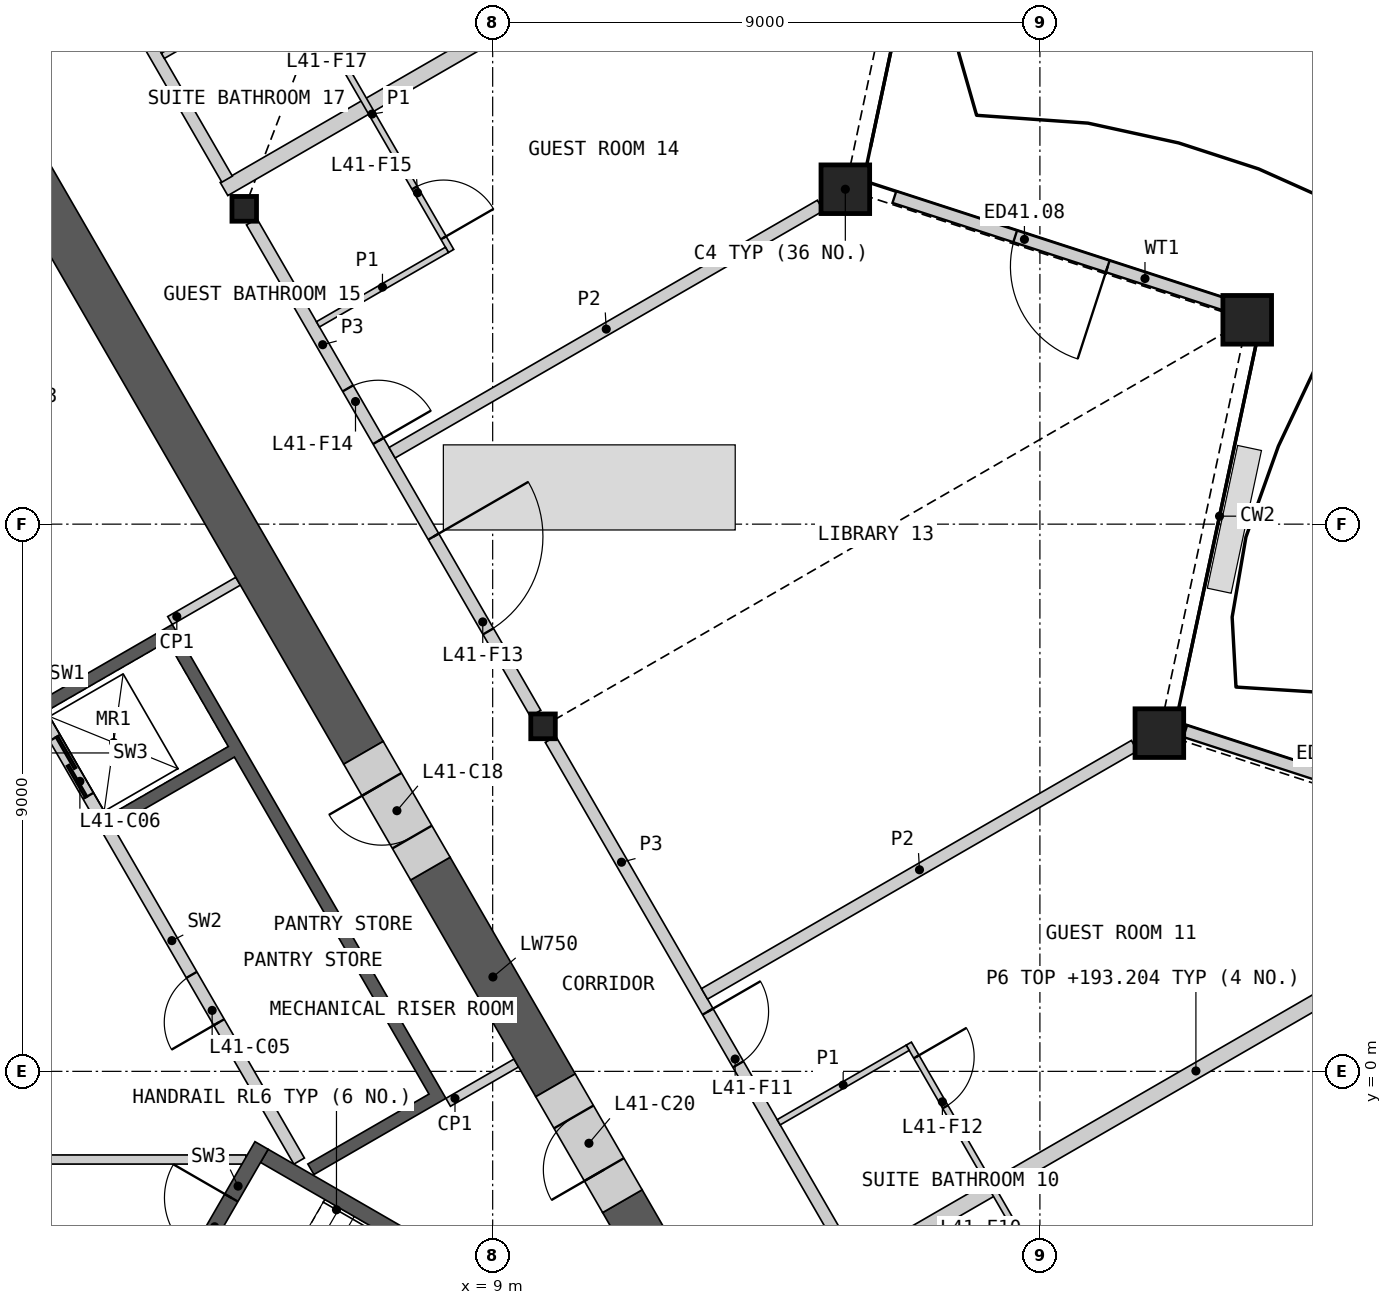
"""IFC4 building model, lengths in metres.
Left out: names, types, materials, properties, quantities, classifications, styles, units other than length and angle.
Written with IfcOpenShell. Run it as: python <this file> out.ifc"""

import sys

from ifc_helpers import new_model, si_unit, direction, frame, frame_2d, origin, origin_2d, place, context, subcontext, project, spatial, polyline, rectangle, hollow_rectangle, i_section, outline, extrude, element, fill, save


model = new_model("IFC4")
c1 = context("Model", 3, precision=1e-05, world=origin(), true_north=direction((0.0, 1.0)))
c2 = subcontext(c1, "Body", "Model", "MODEL_VIEW")
j1 = project(units=[si_unit("LENGTHUNIT", "METRE"), si_unit("PLANEANGLEUNIT", "RADIAN")], contexts=[c1])
p1 = place(None, origin())
s1 = spatial("IfcSite", under=j1, at=p1, CompositionType="ELEMENT")
p2 = place(p1, origin())
s2 = spatial("IfcBuilding", under=s1, at=p2, CompositionType="ELEMENT")
p3 = place(p2, frame((0.0, 0.0, 190.8)))
s3 = spatial("IfcBuildingStorey", under=s2, at=p3, CompositionType="ELEMENT", Elevation=190.8)
for number, where, z_axis, x_axis in (
    (1, (19.965, 5.563, 0.0), (0.0, 0.0, 1.0), (1.0, 0.0, 0.0)),
    (2, (21.409, 12.361, 0.0), (0.0, 0.0, 1.0), (1.0, 0.0, 0.0)),
    (3, (14.8, 14.508, 0.0), (0.0, 0.0, 1.0), (1.0, 0.0, 0.0)),
):
    element("IfcColumn", number, at=place(p3, frame(where, z_axis=z_axis, x_axis=x_axis)), inside=s3, PredefinedType="COLUMN", context=c2, shape_type="SweptSolid", body=[
        extrude(hollow_rectangle(XDim=0.8, YDim=0.8, WallThickness=0.05, at=origin_2d()), origin(), (0.0, 0.0, 1.0), 3.6),
    ])
for number, where, z_axis, x_axis in (
    (4, (9.828, 5.675, 0.0), (0.0, 0.0, 1.0), (1.0, 0.0, 0.0)),
    (5, (4.914, 14.186, 0.0), (0.0, 0.0, 1.0), (1.0, 0.0, 0.0)),
):
    element("IfcColumn", number, at=place(p3, frame(where, z_axis=z_axis, x_axis=x_axis)), inside=s3, PredefinedType="COLUMN", context=c2, shape_type="SweptSolid", body=[
        extrude(i_section(OverallWidth=0.404, OverallDepth=0.407, WebThickness=0.027, FlangeThickness=0.044, at=origin_2d()), origin(), (0.0, 0.0, 1.0), 3.6),
    ])
p4 = place(p3, frame((26.24, 3.693, 0.0), z_axis=(0.0, 0.0, 1.0), x_axis=(-0.951053023356, 0.30902774433, 0.0)))
e6 = element("IfcWall", 6, at=p4, inside=s3, PredefinedType="SOLIDWALL", context=c2, shape_type="SweptSolid", body=[
    extrude(rectangle(XDim=6.152, YDim=0.2, at=frame_2d((3.076, 0.0))), origin(), (0.0, 0.0, 1.0), 2.701),
])
p5 = place(p4, frame((2.089, 0.0, 0.0)))
e7 = element("IfcOpeningElement", 7, at=p5, cuts=e6, PredefinedType="OPENING", context=c2, shape_type="SweptSolid", body=[
    extrude(rectangle(XDim=1.6, YDim=2.4, at=frame_2d((0.8, 1.2))), frame((0.0, 0.11, 0.0), z_axis=(0.0, -1.0, 0.0), x_axis=(1.0, 0.0, 0.0)), (0.0, 0.0, 1.0), 0.22),
])
p6 = place(p3, frame((21.102, 12.593, 0.0), z_axis=(0.0, 0.0, 1.0), x_axis=(-0.951059834965, 0.309006780371, 0.0)))
e8 = element("IfcWall", 8, at=p6, inside=s3, PredefinedType="SOLIDWALL", context=c2, shape_type="SweptSolid", body=[
    extrude(rectangle(XDim=5.779, YDim=0.2, at=frame_2d((2.889, 0.0))), origin(), (0.0, 0.0, 1.0), 2.701),
])
p7 = place(p6, frame((2.089, 0.0, 0.0)))
e9 = element("IfcOpeningElement", 9, at=p7, cuts=e8, PredefinedType="OPENING", context=c2, shape_type="SweptSolid", body=[
    extrude(rectangle(XDim=1.6, YDim=2.4, at=frame_2d((0.8, 1.2))), frame((0.0, 0.11, 0.0), z_axis=(0.0, -1.0, 0.0), x_axis=(1.0, 0.0, 0.0)), (0.0, 0.0, 1.0), 0.22),
])
p8 = place(p3, origin())
e10 = element("IfcWall", 10, at=p8, inside=s3, PredefinedType="SHEAR", context=c2, shape_type="SweptSolid", body=[
    extrude(outline(polyline([(1.561, 6.097), (3.731, 7.35), (8.231, -0.444), (6.061, -1.697), (5.96, -1.524), (7.952, -0.374), (4.752, 5.169), (2.76, 4.019), (2.66, 4.192), (4.652, 5.342), (3.652, 7.074), (1.66, 5.924), (1.561, 6.097)])), origin(), (0.0, 0.0, 1.0), 3.25),
])
p9 = place(p3, frame((5.817, -1.476, 0.0), z_axis=(0.0, 0.0, 1.0), x_axis=(-0.500002616675, 0.866023893041, 0.0)))
e11 = element("IfcWall", 11, at=p9, inside=s3, PredefinedType="SOLIDWALL", context=c2, shape_type="SweptSolid", body=[
    extrude(rectangle(XDim=8.373, YDim=0.2, at=frame_2d((4.187, 0.0))), origin(), (0.0, 0.0, 1.0), 3.25),
])
p10 = place(p9, frame((2.637, 0.0, 0.0)))
e12 = element("IfcOpeningElement", 12, at=p10, cuts=e11, PredefinedType="OPENING", context=c2, shape_type="SweptSolid", body=[
    extrude(rectangle(XDim=0.9, YDim=2.1, at=frame_2d((0.45, 1.05))), frame((0.0, 0.11, 0.0), z_axis=(0.0, -1.0, 0.0), x_axis=(1.0, 0.0, 0.0)), (0.0, 0.0, 1.0), 0.22),
])
p11 = place(p9, frame((6.937, 0.0, 0.0)))
e13 = element("IfcOpeningElement", 13, at=p11, cuts=e11, PredefinedType="OPENING", context=c2, shape_type="SweptSolid", body=[
    extrude(rectangle(XDim=1.1, YDim=2.1, at=frame_2d((0.55, 1.05))), frame((0.0, 0.11, 0.0), z_axis=(0.0, -1.0, 0.0), x_axis=(1.0, 0.0, 0.0)), (0.0, 0.0, 1.0), 0.22),
])
p12 = place(p3, frame((-4.941, -1.45, 0.0), z_axis=(0.0, 0.0, 1.0), x_axis=(1.0, 0.0, 0.0)))
e14 = element("IfcWall", 14, at=p12, inside=s3, PredefinedType="PARTITIONING", context=c2, shape_type="SweptSolid", body=[
    extrude(rectangle(XDim=9.882, YDim=0.15, at=frame_2d((4.941, 0.0))), origin(), (0.0, 0.0, 1.0), 3.25),
])
p13 = place(p12, frame((4.391, 0.0, 0.0)))
e15 = element("IfcOpeningElement", 15, at=p13, cuts=e14, PredefinedType="OPENING", context=c2, shape_type="SweptSolid", body=[
    extrude(rectangle(XDim=1.1, YDim=2.1, at=frame_2d((0.55, 1.05))), frame((0.0, 0.085, 0.0), z_axis=(0.0, -1.0, 0.0), x_axis=(1.0, 0.0, 0.0)), (0.0, 0.0, 1.0), 0.17),
])
p14 = place(p3, origin())
e16 = element("IfcWall", 16, at=p14, inside=s3, PredefinedType="SHEAR", context=c2, shape_type="SweptSolid", body=[
    extrude(outline(polyline([(10.032, -4.298), (10.374, -4.206), (5.307, -1.281), (5.182, -1.498), (10.032, -4.298)])), origin(), (0.0, 0.0, 1.0), 3.25),
])
p15 = place(p3, frame((3.655, -3.893, 0.0), z_axis=(0.0, 0.0, 1.0), x_axis=(0.499982516597, 0.866035497597, 0.0)))
e17 = element("IfcWall", 17, at=p15, inside=s3, PredefinedType="SHEAR", context=c2, shape_type="SweptSolid", body=[
    extrude(rectangle(XDim=3.088, YDim=0.25, at=frame_2d((1.544, 0.0))), origin(), (0.0, 0.0, 1.0), 3.25),
])
p16 = place(p15, frame((0.994, 0.0, 0.0)))
e18 = element("IfcOpeningElement", 18, at=p16, cuts=e17, PredefinedType="OPENING", context=c2, shape_type="SweptSolid", body=[
    extrude(rectangle(XDim=1.1, YDim=2.1, at=frame_2d((0.55, 1.05))), frame((0.0, 0.135, 0.0), z_axis=(0.0, -1.0, 0.0), x_axis=(1.0, 0.0, 0.0)), (0.0, 0.0, 1.0), 0.27),
])
for number, where, z_axis, x_axis in (
    (19, (3.693, 7.415, 0.0), (0.0, 0.0, 1.0), (0.866, 0.5, 0.0)),
    (20, (8.268, -0.509, 0.0), (0.0, 0.0, 1.0), (0.866, 0.5, 0.0)),
):
    element("IfcWall", number, at=place(p3, frame(where, z_axis=z_axis, x_axis=x_axis)), inside=s3, PredefinedType="PARTITIONING", context=c2, shape_type="SweptSolid", body=[
        extrude(rectangle(XDim=1.293, YDim=0.15, at=frame_2d((0.646, 0.0))), origin(), (0.0, 0.0, 1.0), 3.25),
    ])
p17 = place(p3, frame((6.875, 5.24, 0.0), z_axis=(0.0, 0.0, 1.0), x_axis=(-0.499997217876, 0.866027010039, 0.0)))
e21 = element("IfcWall", 21, at=p17, inside=s3, PredefinedType="SHEAR", context=c2, shape_type="SweptSolid", body=[
    extrude(rectangle(XDim=13.101, YDim=0.75, at=frame_2d((6.551, 0.0))), origin(), (0.0, 0.0, 1.0), 3.25),
])
p18 = place(p3, frame((14.526, -8.011, 0.0), z_axis=(0.0, 0.0, 1.0), x_axis=(-0.499982018922, 0.866035784916, 0.0)))
e22 = element("IfcWall", 22, at=p18, inside=s3, PredefinedType="SHEAR", context=c2, shape_type="SweptSolid", body=[
    extrude(rectangle(XDim=6.785, YDim=0.75, at=frame_2d((3.393, 0.0))), origin(), (0.0, 0.0, 1.0), 3.25),
])
p19 = place(p3, frame((10.033, -0.23, 0.0), z_axis=(0.0, 0.0, 1.0), x_axis=(-0.500030520673, 0.866007781949, 0.0)))
e23 = element("IfcWall", 23, at=p19, inside=s3, PredefinedType="SHEAR", context=c2, shape_type="SweptSolid", body=[
    extrude(rectangle(XDim=4.116, YDim=0.75, at=frame_2d((2.058, 0.0))), origin(), (0.0, 0.0, 1.0), 3.25),
])
p20 = place(p3, frame((7.975, 3.334, 0.0), z_axis=(0.0, 0.0, 1.0), x_axis=(-0.500077893725, 0.86598042715, 0.0)))
e24 = element("IfcWall", 24, at=p20, inside=s3, PredefinedType="SHEAR", context=c2, shape_type="SweptSolid", body=[
    extrude(rectangle(XDim=2.2, YDim=0.75, at=frame_2d((1.1, 0.0))), origin(), (0.0, 0.0, 1.0), 3.25),
])
p21 = place(p20, frame((0.6, 0.0, 0.0)))
e25 = element("IfcOpeningElement", 25, at=p21, cuts=e24, PredefinedType="OPENING", context=c2, shape_type="SweptSolid", body=[
    extrude(rectangle(XDim=1.0, YDim=2.1, at=frame_2d((0.5, 1.05))), frame((0.0, 0.385, 0.0), z_axis=(0.0, -1.0, 0.0), x_axis=(1.0, 0.0, 0.0)), (0.0, 0.0, 1.0), 0.77),
])
p22 = place(p3, frame((11.133, -2.135, 0.0), z_axis=(0.0, 0.0, 1.0), x_axis=(-0.499981787252, 0.866035918664, 0.0)))
e26 = element("IfcWall", 26, at=p22, inside=s3, PredefinedType="SHEAR", context=c2, shape_type="SweptSolid", body=[
    extrude(rectangle(XDim=2.2, YDim=0.75, at=frame_2d((1.1, 0.0))), origin(), (0.0, 0.0, 1.0), 3.25),
])
p23 = place(p22, frame((0.6, 0.0, 0.0)))
e27 = element("IfcOpeningElement", 27, at=p23, cuts=e26, PredefinedType="OPENING", context=c2, shape_type="SweptSolid", body=[
    extrude(rectangle(XDim=1.0, YDim=2.1, at=frame_2d((0.5, 1.05))), frame((0.0, 0.385, 0.0), z_axis=(0.0, -1.0, 0.0), x_axis=(1.0, 0.0, 0.0)), (0.0, 0.0, 1.0), 0.77),
])
p24 = place(p3, frame((14.967, -3.226, 0.0), z_axis=(0.0, 0.0, 1.0), x_axis=(0.866030250269, 0.499991605548, 0.0)))
e28 = element("IfcWall", 28, at=p24, inside=s3, PredefinedType="PARTITIONING", context=c2, shape_type="SweptSolid", body=[
    extrude(rectangle(XDim=12.929, YDim=0.25, at=frame_2d((6.465, 0.0))), origin(), (0.0, 0.0, 1.0), 2.404),
])
p25 = place(p3, frame((4.582, 14.512, 0.0), z_axis=(0.0, 0.0, 1.0), x_axis=(0.866027263711, 0.4999967785, 0.0)))
e29 = element("IfcWall", 29, at=p25, inside=s3, PredefinedType="PARTITIONING", context=c2, shape_type="SweptSolid", body=[
    extrude(rectangle(XDim=12.994, YDim=0.25, at=frame_2d((6.497, 0.0))), origin(), (0.0, 0.0, 1.0), 2.404),
])
p26 = place(p3, frame((5.038, 13.972, 0.0), z_axis=(0.0, 0.0, 1.0), x_axis=(0.50000393355, -0.866023132736, 0.0)))
e30 = element("IfcWall", 30, at=p26, inside=s3, PredefinedType="PARTITIONING", context=c2, shape_type="SweptSolid", body=[
    extrude(rectangle(XDim=9.335, YDim=0.2, at=frame_2d((4.667, 0.0))), origin(), (0.0, 0.0, 1.0), 3.25),
])
p27 = place(p26, frame((5.979, 0.0, 0.0)))
e31 = element("IfcOpeningElement", 31, at=p27, cuts=e30, PredefinedType="OPENING", context=c2, shape_type="SweptSolid", body=[
    extrude(rectangle(XDim=1.8, YDim=2.1, at=frame_2d((0.9, 1.05))), frame((0.0, 0.11, 0.0), z_axis=(0.0, -1.0, 0.0), x_axis=(1.0, 0.0, 0.0)), (0.0, 0.0, 1.0), 0.22),
])
p28 = place(p26, frame((3.163, 0.0, 0.0)))
e32 = element("IfcOpeningElement", 32, at=p28, cuts=e30, PredefinedType="OPENING", context=c2, shape_type="SweptSolid", body=[
    extrude(rectangle(XDim=1.0, YDim=2.1, at=frame_2d((0.5, 1.05))), frame((0.0, 0.11, 0.0), z_axis=(0.0, -1.0, 0.0), x_axis=(1.0, 0.0, 0.0)), (0.0, 0.0, 1.0), 0.22),
])
p29 = place(p3, frame((9.952, 5.461, 0.0), z_axis=(0.0, 0.0, 1.0), x_axis=(0.50000393355, -0.866023132736, 0.0)))
e33 = element("IfcWall", 33, at=p29, inside=s3, PredefinedType="PARTITIONING", context=c2, shape_type="SweptSolid", body=[
    extrude(rectangle(XDim=9.335, YDim=0.2, at=frame_2d((4.667, 0.0))), origin(), (0.0, 0.0, 1.0), 3.25),
])
p30 = place(p29, frame((5.172, 0.0, 0.0)))
e34 = element("IfcOpeningElement", 34, at=p30, cuts=e33, PredefinedType="OPENING", context=c2, shape_type="SweptSolid", body=[
    extrude(rectangle(XDim=1.0, YDim=2.1, at=frame_2d((0.5, 1.05))), frame((0.0, 0.11, 0.0), z_axis=(0.0, -1.0, 0.0), x_axis=(1.0, 0.0, 0.0)), (0.0, 0.0, 1.0), 0.22),
])
p31 = place(p3, frame((1.913, 19.385, 0.0), z_axis=(0.0, 0.0, 1.0), x_axis=(0.499972435384, -0.866041317638, 0.0)))
e35 = element("IfcWall", 35, at=p31, inside=s3, PredefinedType="PARTITIONING", context=c2, shape_type="SweptSolid", body=[
    extrude(rectangle(XDim=5.439, YDim=0.2, at=frame_2d((2.719, 0.0))), origin(), (0.0, 0.0, 1.0), 3.25),
])
p32 = place(p31, frame((0.351, 0.0, 0.0)))
e36 = element("IfcOpeningElement", 36, at=p32, cuts=e35, PredefinedType="OPENING", context=c2, shape_type="SweptSolid", body=[
    extrude(rectangle(XDim=1.1, YDim=2.1, at=frame_2d((0.55, 1.05))), frame((0.0, 0.11, 0.0), z_axis=(0.0, -1.0, 0.0), x_axis=(1.0, 0.0, 0.0)), (0.0, 0.0, 1.0), 0.22),
])
p33 = place(p3, frame((12.484, 1.274, 0.0), z_axis=(0.0, 0.0, 1.0), x_axis=(0.866026229868, 0.499998569178, 0.0)))
e37 = element("IfcWall", 37, at=p33, inside=s3, PredefinedType="PARTITIONING", context=c2, shape_type="SweptSolid", body=[
    extrude(rectangle(XDim=8.164, YDim=0.2, at=frame_2d((4.082, 0.0))), origin(), (0.0, 0.0, 1.0), 2.404),
])
p34 = place(p3, frame((7.346, 10.175, 0.0), z_axis=(0.0, 0.0, 1.0), x_axis=(0.86602913801, 0.499993532075, 0.0)))
e38 = element("IfcWall", 38, at=p34, inside=s3, PredefinedType="PARTITIONING", context=c2, shape_type="SweptSolid", body=[
    extrude(rectangle(XDim=8.134, YDim=0.2, at=frame_2d((4.067, 0.0))), origin(), (0.0, 0.0, 1.0), 2.404),
])
p35 = place(p3, frame((15.844, 0.456, 0.0), z_axis=(0.0, 0.0, 1.0), x_axis=(0.500006934395, -0.866021400173, 0.0)))
e39 = element("IfcWall", 39, at=p35, inside=s3, PredefinedType="PARTITIONING", context=c2, shape_type="SweptSolid", body=[
    extrude(rectangle(XDim=5.2, YDim=0.1, at=frame_2d((2.6, 0.0))), origin(), (0.0, 0.0, 1.0), 2.404),
])
p36 = place(p35, frame((4.0, 0.0, 0.0)))
e40 = element("IfcOpeningElement", 40, at=p36, cuts=e39, PredefinedType="OPENING", context=c2, shape_type="SweptSolid", body=[
    extrude(rectangle(XDim=0.95, YDim=2.1, at=frame_2d((0.475, 1.05))), frame((0.0, 0.06, 0.0), z_axis=(0.0, -1.0, 0.0), x_axis=(1.0, 0.0, 0.0)), (0.0, 0.0, 1.0), 0.12),
])
p37 = place(p35, frame((0.25, 0.0, 0.0)))
e41 = element("IfcOpeningElement", 41, at=p37, cuts=e39, PredefinedType="OPENING", context=c2, shape_type="SweptSolid", body=[
    extrude(rectangle(XDim=0.95, YDim=2.1, at=frame_2d((0.475, 1.05))), frame((0.0, 0.06, 0.0), z_axis=(0.0, -1.0, 0.0), x_axis=(1.0, 0.0, 0.0)), (0.0, 0.0, 1.0), 0.12),
])
p38 = place(p3, frame((5.717, 17.996, 0.0), z_axis=(0.0, 0.0, 1.0), x_axis=(0.500027264788, -0.866009661879, 0.0)))
e42 = element("IfcWall", 42, at=p38, inside=s3, PredefinedType="PARTITIONING", context=c2, shape_type="SweptSolid", body=[
    extrude(rectangle(XDim=5.2, YDim=0.1, at=frame_2d((2.6, 0.0))), origin(), (0.0, 0.0, 1.0), 2.404),
])
p39 = place(p38, frame((4.0, 0.0, 0.0)))
e43 = element("IfcOpeningElement", 43, at=p39, cuts=e42, PredefinedType="OPENING", context=c2, shape_type="SweptSolid", body=[
    extrude(rectangle(XDim=0.95, YDim=2.1, at=frame_2d((0.475, 1.05))), frame((0.0, 0.06, 0.0), z_axis=(0.0, -1.0, 0.0), x_axis=(1.0, 0.0, 0.0)), (0.0, 0.0, 1.0), 0.12),
])
p40 = place(p38, frame((0.25, 0.0, 0.0)))
e44 = element("IfcOpeningElement", 44, at=p40, cuts=e42, PredefinedType="OPENING", context=c2, shape_type="SweptSolid", body=[
    extrude(rectangle(XDim=0.95, YDim=2.1, at=frame_2d((0.475, 1.05))), frame((0.0, 0.06, 0.0), z_axis=(0.0, -1.0, 0.0), x_axis=(1.0, 0.0, 0.0)), (0.0, 0.0, 1.0), 0.12),
])
p41 = place(p3, frame((3.576, 16.703, 0.0), z_axis=(0.0, 0.0, 1.0), x_axis=(0.866057815567, 0.499943856944, 0.0)))
e45 = element("IfcWall", 45, at=p41, inside=s3, PredefinedType="PARTITIONING", context=c2, shape_type="SweptSolid", body=[
    extrude(rectangle(XDim=2.45, YDim=0.1, at=frame_2d((1.225, 0.0))), origin(), (0.0, 0.0, 1.0), 2.404),
])
p42 = place(p3, frame((6.126, 12.286, 0.0), z_axis=(0.0, 0.0, 1.0), x_axis=(0.866014668023, 0.500018594424, 0.0)))
e46 = element("IfcWall", 46, at=p42, inside=s3, PredefinedType="PARTITIONING", context=c2, shape_type="SweptSolid", body=[
    extrude(rectangle(XDim=2.45, YDim=0.1, at=frame_2d((1.225, 0.0))), origin(), (0.0, 0.0, 1.0), 2.404),
])
p43 = place(p3, frame((13.704, -0.837, 0.0), z_axis=(0.0, 0.0, 1.0), x_axis=(0.865989751695, 0.500061746146, 0.0)))
e47 = element("IfcWall", 47, at=p43, inside=s3, PredefinedType="PARTITIONING", context=c2, shape_type="SweptSolid", body=[
    extrude(rectangle(XDim=2.45, YDim=0.1, at=frame_2d((1.225, 0.0))), origin(), (0.0, 0.0, 1.0), 2.404),
])
p44 = place(p7, origin())
e48 = element("IfcDoor", 48, at=p44, inside=s3, OperationType="DOUBLE_DOOR_SINGLE_SWING", PredefinedType="DOOR", context=c2, shape_type="SweptSolid", body=[
    extrude(rectangle(XDim=1.6, YDim=2.4, at=frame_2d((0.8, 1.2))), frame((0.0, 0.025, 0.0), z_axis=(0.0, -1.0, 0.0), x_axis=(1.0, 0.0, 0.0)), (0.0, 0.0, 1.0), 0.05),
])
fill(e9, e48)
p45 = place(p10, origin())
e49 = element("IfcDoor", 49, at=p45, inside=s3, OperationType="SINGLE_SWING_LEFT", PredefinedType="DOOR", context=c2, shape_type="SweptSolid", body=[
    extrude(rectangle(XDim=0.9, YDim=2.1, at=frame_2d((0.45, 1.05))), frame((0.0, 0.025, 0.0), z_axis=(0.0, -1.0, 0.0), x_axis=(1.0, 0.0, 0.0)), (0.0, 0.0, 1.0), 0.05),
])
fill(e12, e49)
p46 = place(p11, origin())
e50 = element("IfcDoor", 50, at=p46, inside=s3, OperationType="SLIDING_TO_LEFT", PredefinedType="DOOR", context=c2, shape_type="SweptSolid", body=[
    extrude(rectangle(XDim=1.1, YDim=2.1, at=frame_2d((0.55, 1.05))), frame((0.0, 0.025, 0.0), z_axis=(0.0, -1.0, 0.0), x_axis=(1.0, 0.0, 0.0)), (0.0, 0.0, 1.0), 0.05),
])
fill(e13, e50)
p47 = place(p16, origin())
e51 = element("IfcDoor", 51, at=p47, inside=s3, OperationType="SINGLE_SWING_RIGHT", PredefinedType="DOOR", context=c2, shape_type="SweptSolid", body=[
    extrude(rectangle(XDim=1.1, YDim=2.1, at=frame_2d((0.55, 1.05))), frame((0.0, 0.025, 0.0), z_axis=(0.0, -1.0, 0.0), x_axis=(1.0, 0.0, 0.0)), (0.0, 0.0, 1.0), 0.05),
])
fill(e18, e51)
p48 = place(p21, origin())
e52 = element("IfcDoor", 52, at=p48, inside=s3, OperationType="SINGLE_SWING_RIGHT", PredefinedType="DOOR", context=c2, shape_type="SweptSolid", body=[
    extrude(rectangle(XDim=1.0, YDim=2.1, at=frame_2d((0.5, 1.05))), frame((0.0, 0.13, 0.0), z_axis=(0.0, -1.0, 0.0), x_axis=(1.0, 0.0, 0.0)), (0.0, 0.0, 1.0), 0.05),
])
fill(e25, e52)
p49 = place(p23, origin())
e53 = element("IfcDoor", 53, at=p49, inside=s3, OperationType="SINGLE_SWING_LEFT", PredefinedType="DOOR", context=c2, shape_type="SweptSolid", body=[
    extrude(rectangle(XDim=1.0, YDim=2.1, at=frame_2d((0.5, 1.05))), frame((0.0, 0.13, 0.0), z_axis=(0.0, -1.0, 0.0), x_axis=(1.0, 0.0, 0.0)), (0.0, 0.0, 1.0), 0.05),
])
fill(e27, e53)
p50 = place(p30, origin())
e54 = element("IfcDoor", 54, at=p50, inside=s3, OperationType="SINGLE_SWING_LEFT", PredefinedType="DOOR", context=c2, shape_type="SweptSolid", body=[
    extrude(rectangle(XDim=1.0, YDim=2.1, at=frame_2d((0.5, 1.05))), frame((0.0, 0.025, 0.0), z_axis=(0.0, -1.0, 0.0), x_axis=(1.0, 0.0, 0.0)), (0.0, 0.0, 1.0), 0.05),
])
fill(e34, e54)
p51 = place(p37, origin())
e55 = element("IfcDoor", 55, at=p51, inside=s3, OperationType="SINGLE_SWING_LEFT", PredefinedType="DOOR", context=c2, shape_type="SweptSolid", body=[
    extrude(rectangle(XDim=0.95, YDim=2.1, at=frame_2d((0.475, 1.05))), frame((0.0, 0.025, 0.0), z_axis=(0.0, -1.0, 0.0), x_axis=(1.0, 0.0, 0.0)), (0.0, 0.0, 1.0), 0.05),
])
fill(e41, e55)
p52 = place(p27, origin())
e56 = element("IfcDoor", 56, at=p52, inside=s3, OperationType="DOUBLE_DOOR_SINGLE_SWING", PredefinedType="DOOR", context=c2, shape_type="SweptSolid", body=[
    extrude(rectangle(XDim=1.8, YDim=2.1, at=frame_2d((0.9, 1.05))), frame((0.0, 0.025, 0.0), z_axis=(0.0, -1.0, 0.0), x_axis=(1.0, 0.0, 0.0)), (0.0, 0.0, 1.0), 0.05),
])
fill(e31, e56)
p53 = place(p28, origin())
e57 = element("IfcDoor", 57, at=p53, inside=s3, OperationType="SINGLE_SWING_RIGHT", PredefinedType="DOOR", context=c2, shape_type="SweptSolid", body=[
    extrude(rectangle(XDim=1.0, YDim=2.1, at=frame_2d((0.5, 1.05))), frame((0.0, 0.025, 0.0), z_axis=(0.0, -1.0, 0.0), x_axis=(1.0, 0.0, 0.0)), (0.0, 0.0, 1.0), 0.05),
])
fill(e32, e57)
p54 = place(p39, origin())
e58 = element("IfcDoor", 58, at=p54, inside=s3, OperationType="SINGLE_SWING_RIGHT", PredefinedType="DOOR", context=c2, shape_type="SweptSolid", body=[
    extrude(rectangle(XDim=0.95, YDim=2.1, at=frame_2d((0.475, 1.05))), frame((0.0, 0.025, 0.0), z_axis=(0.0, -1.0, 0.0), x_axis=(1.0, 0.0, 0.0)), (0.0, 0.0, 1.0), 0.05),
])
fill(e43, e58)
save(model, sys.argv[1])
